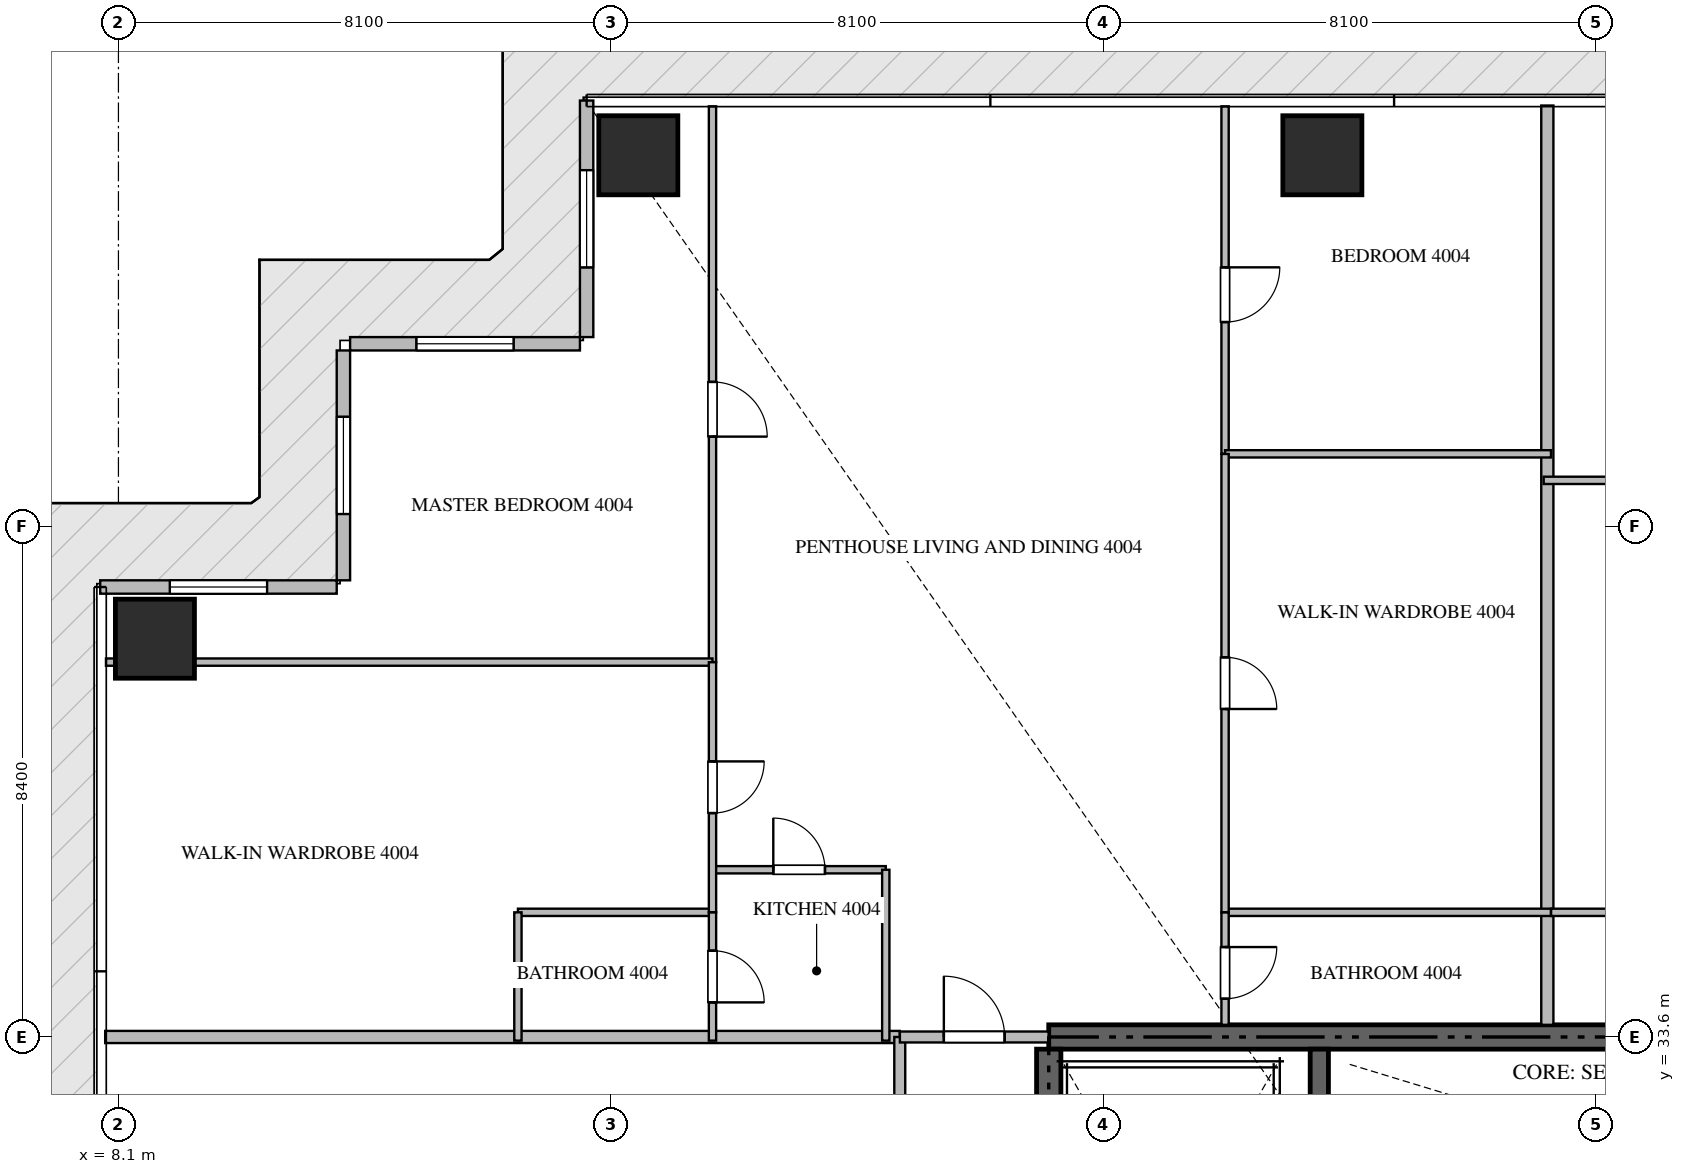
"""IFC4 building model, lengths in metres.
Left out: names, types, materials, properties, quantities, classifications, styles, units other than length and angle.
Written with IfcOpenShell. Run it as: python <this file> out.ifc"""

import sys

from ifc_helpers import new_model, si_unit, direction, frame, frame_2d, origin, origin_2d, place, context, subcontext, project, spatial, rectangle, extrude, source, transform, mapped, element, fill, save


model = new_model("IFC4")
c1 = context("Model", 3, precision=1e-05, world=origin(), true_north=direction((0.0, 1.0)))
c2 = subcontext(c1, "Body", "Model", "MODEL_VIEW")
j1 = project(units=[si_unit("LENGTHUNIT", "METRE"), si_unit("PLANEANGLEUNIT", "RADIAN")], contexts=[c1])
p1 = place(None, origin())
s1 = spatial("IfcSite", under=j1, at=p1, CompositionType="ELEMENT")
p2 = place(p1, origin())
s2 = spatial("IfcBuilding", under=s1, at=p2, CompositionType="ELEMENT")
p3 = place(p2, frame((0.0, 0.0, 161.4)))
s3 = spatial("IfcBuildingStorey", under=s2, at=p3, CompositionType="ELEMENT", Elevation=161.4)
p4 = place(p3, frame((41.4, 33.6, -0.26), z_axis=(0.0, 0.0, 1.0), x_axis=(-1.0, 0.0, 0.0)))
e1 = element("IfcWall", 1, at=p4, inside=s3, PredefinedType="SHEAR", context=c2, shape_type="SweptSolid", body=[
    extrude(rectangle(XDim=18.0, YDim=0.4, at=frame_2d((9.0, 0.0))), origin(), (0.0, 0.0, 1.0), 3.748),
])
p5 = place(p3, frame((23.4, 24.25, -0.26), z_axis=(0.0, 0.0, 1.0), x_axis=(0.0, 1.0, 0.0)))
e2 = element("IfcWall", 2, at=p5, inside=s3, PredefinedType="SHEAR", context=c2, shape_type="SweptSolid", body=[
    extrude(rectangle(XDim=9.15, YDim=0.4, at=frame_2d((4.575, 0.0))), origin(), (0.0, 0.0, 1.0), 3.748),
])
p6 = place(p3, frame((27.85, 23.55, -0.26), z_axis=(0.0, 0.0, 1.0), x_axis=(0.0, 1.0, 0.0)))
e3 = element("IfcWall", 3, at=p6, inside=s3, PredefinedType="SHEAR", context=c2, shape_type="SweptSolid", body=[
    extrude(rectangle(XDim=9.85, YDim=0.3, at=frame_2d((4.925, 0.0))), origin(), (0.0, 0.0, 1.0), 3.748),
])
m1 = source(origin(), c2, "Body", "SweptSolid", [
    extrude(rectangle(XDim=1.3, YDim=1.3, at=origin_2d()), origin(), (0.0, 0.0, 1.0), 3.75),
])
for number, where, z_axis, x_axis in (
    (4, (16.65, 48.1, -0.26), (0.0, 0.0, 1.0), (1.0, 0.0, 0.0)),
    (5, (27.9, 48.1, -0.26), (0.0, 0.0, 1.0), (1.0, 0.0, 0.0)),
    (6, (8.7, 40.15, -0.26), (0.0, 0.0, 1.0), (1.0, 0.0, 0.0)),
):
    element("IfcColumn", number, at=place(p3, frame(where, z_axis=z_axis, x_axis=x_axis)), inside=s3, PredefinedType="COLUMN", context=c2, shape_type="MappedRepresentation", body=[
        mapped(m1, transform((0.0, 0.0, 0.0), scale=1.0)),
    ])
p7 = place(p3, frame((15.8, 49.0, 0.0), z_axis=(0.0, 0.0, 1.0), x_axis=(0.0, -1.0, 0.0)))
e7 = element("IfcWall", 7, at=p7, inside=s3, PredefinedType="ELEMENTEDWALL", context=c2, shape_type="SweptSolid", body=[
    extrude(rectangle(XDim=3.89, YDim=0.22, at=frame_2d((1.945, 0.0))), origin(), (0.0, 0.0, 1.0), 3.475),
])
p8 = place(p7, frame((1.145, 0.0, 0.65)))
e8 = element("IfcOpeningElement", 8, at=p8, cuts=e7, PredefinedType="OPENING", context=c2, shape_type="SweptSolid", body=[
    extrude(rectangle(XDim=1.6, YDim=2.1, at=frame_2d((0.8, 1.05))), frame((0.0, 0.12, 0.0), z_axis=(0.0, -1.0, 0.0), x_axis=(1.0, 0.0, 0.0)), (0.0, 0.0, 1.0), 0.24),
])
p9 = place(p3, frame((15.69, 45.0, 0.0), z_axis=(0.0, 0.0, 1.0), x_axis=(-1.0, 0.0, 0.0)))
e9 = element("IfcWall", 9, at=p9, inside=s3, PredefinedType="ELEMENTEDWALL", context=c2, shape_type="SweptSolid", body=[
    extrude(rectangle(XDim=3.78, YDim=0.22, at=frame_2d((1.89, 0.0))), origin(), (0.0, 0.0, 1.0), 3.475),
])
p10 = place(p9, frame((1.09, 0.0, 0.65)))
e10 = element("IfcOpeningElement", 10, at=p10, cuts=e9, PredefinedType="OPENING", context=c2, shape_type="SweptSolid", body=[
    extrude(rectangle(XDim=1.6, YDim=2.1, at=frame_2d((0.8, 1.05))), frame((0.0, 0.12, 0.0), z_axis=(0.0, -1.0, 0.0), x_axis=(1.0, 0.0, 0.0)), (0.0, 0.0, 1.0), 0.24),
])
p11 = place(p3, frame((11.8, 44.89, 0.0), z_axis=(0.0, 0.0, 1.0), x_axis=(0.0, -1.0, 0.0)))
e11 = element("IfcWall", 11, at=p11, inside=s3, PredefinedType="ELEMENTEDWALL", context=c2, shape_type="SweptSolid", body=[
    extrude(rectangle(XDim=3.78, YDim=0.22, at=frame_2d((1.89, 0.0))), origin(), (0.0, 0.0, 1.0), 3.475),
])
p12 = place(p11, frame((1.09, 0.0, 0.65)))
e12 = element("IfcOpeningElement", 12, at=p12, cuts=e11, PredefinedType="OPENING", context=c2, shape_type="SweptSolid", body=[
    extrude(rectangle(XDim=1.6, YDim=2.1, at=frame_2d((0.8, 1.05))), frame((0.0, 0.12, 0.0), z_axis=(0.0, -1.0, 0.0), x_axis=(1.0, 0.0, 0.0)), (0.0, 0.0, 1.0), 0.24),
])
p13 = place(p3, frame((11.69, 41.0, 0.0), z_axis=(0.0, 0.0, 1.0), x_axis=(-1.0, 0.0, 0.0)))
e13 = element("IfcWall", 13, at=p13, inside=s3, PredefinedType="ELEMENTEDWALL", context=c2, shape_type="SweptSolid", body=[
    extrude(rectangle(XDim=3.89, YDim=0.22, at=frame_2d((1.945, 0.0))), origin(), (0.0, 0.0, 1.0), 3.475),
])
p14 = place(p13, frame((1.145, 0.0, 0.65)))
e14 = element("IfcOpeningElement", 14, at=p14, cuts=e13, PredefinedType="OPENING", context=c2, shape_type="SweptSolid", body=[
    extrude(rectangle(XDim=1.6, YDim=2.1, at=frame_2d((0.8, 1.05))), frame((0.0, 0.12, 0.0), z_axis=(0.0, -1.0, 0.0), x_axis=(1.0, 0.0, 0.0)), (0.0, 0.0, 1.0), 0.24),
])
p15 = place(p3, frame((31.6, 33.8, 0.0), z_axis=(0.0, 0.0, 1.0), x_axis=(0.0, 1.0, 0.0)))
e15 = element("IfcWall", 15, at=p15, inside=s3, PredefinedType="PARTITIONING", context=c2, shape_type="SweptSolid", body=[
    extrude(rectangle(XDim=15.118, YDim=0.2, at=frame_2d((7.559, 0.0))), origin(), (0.0, 0.0, 1.0), 3.49),
])
p16 = place(p3, frame((7.882, 33.6, 0.0), z_axis=(0.0, 0.0, 1.0), x_axis=(1.0, 0.0, 0.0)))
e16 = element("IfcWall", 16, at=p16, inside=s3, PredefinedType="PARTITIONING", context=c2, shape_type="SweptSolid", body=[
    extrude(rectangle(XDim=13.068, YDim=0.2, at=frame_2d((6.534, 0.0))), origin(), (0.0, 0.0, 1.0), 3.49),
])
p17 = place(p3, frame((20.95, 14.9, 0.0), z_axis=(0.0, 0.0, 1.0), x_axis=(0.0, 1.0, 0.0)))
e17 = element("IfcWall", 17, at=p17, inside=s3, PredefinedType="PARTITIONING", context=c2, shape_type="SweptSolid", body=[
    extrude(rectangle(XDim=18.7, YDim=0.18, at=frame_2d((9.35, 0.0))), origin(), (0.0, 0.0, 1.0), 3.49),
])
p18 = place(p17, frame((14.603, 0.0, 0.0)))
e18 = element("IfcOpeningElement", 18, at=p18, cuts=e17, PredefinedType="OPENING", context=c2, shape_type="SweptSolid", body=[
    extrude(rectangle(XDim=1.0, YDim=2.15, at=frame_2d((0.5, 1.075))), frame((0.0, 0.1, 0.0), z_axis=(0.0, -1.0, 0.0), x_axis=(1.0, 0.0, 0.0)), (0.0, 0.0, 1.0), 0.2),
])
p19 = place(p3, frame((20.952, 33.6, 0.0), z_axis=(0.0, 0.0, 1.0), x_axis=(1.0, 0.0, 0.0)))
e19 = element("IfcWall", 19, at=p19, inside=s3, PredefinedType="PARTITIONING", context=c2, shape_type="SweptSolid", body=[
    extrude(rectangle(XDim=2.446, YDim=0.18, at=frame_2d((1.223, 0.0))), origin(), (0.0, 0.0, 1.0), 3.49),
])
p20 = place(p19, frame((0.723, 0.0, 0.0)))
e20 = element("IfcOpeningElement", 20, at=p20, cuts=e19, PredefinedType="OPENING", context=c2, shape_type="SweptSolid", body=[
    extrude(rectangle(XDim=1.0, YDim=2.15, at=frame_2d((0.5, 1.075))), frame((0.0, 0.1, 0.0), z_axis=(0.0, -1.0, 0.0), x_axis=(1.0, 0.0, 0.0)), (0.0, 0.0, 1.0), 0.2),
])
p21 = place(p3, frame((17.87, 36.35, 0.0), z_axis=(0.0, 0.0, 1.0), x_axis=(1.0, 0.0, 0.0)))
e21 = element("IfcWall", 21, at=p21, inside=s3, PredefinedType="PARTITIONING", context=c2, shape_type="SweptSolid", body=[
    extrude(rectangle(XDim=2.85, YDim=0.12, at=frame_2d((1.425, 0.0))), origin(), (0.0, 0.0, 1.0), 3.49),
])
p22 = place(p21, frame((1.0, 0.0, 0.0)))
e22 = element("IfcOpeningElement", 22, at=p22, cuts=e21, PredefinedType="OPENING", context=c2, shape_type="SweptSolid", body=[
    extrude(rectangle(XDim=0.85, YDim=2.1, at=frame_2d((0.425, 1.05))), frame((0.0, 0.07, 0.0), z_axis=(0.0, -1.0, 0.0), x_axis=(1.0, 0.0, 0.0)), (0.0, 0.0, 1.0), 0.14),
])
p23 = place(p3, frame((20.72, 36.35, 0.0), z_axis=(0.0, 0.0, 1.0), x_axis=(0.0, -1.0, 0.0)))
e23 = element("IfcWall", 23, at=p23, inside=s3, PredefinedType="PARTITIONING", context=c2, shape_type="SweptSolid", body=[
    extrude(rectangle(XDim=2.81, YDim=0.12, at=frame_2d((1.405, 0.0))), origin(), (0.0, 0.0, 1.0), 3.49),
])
p24 = place(p3, frame((17.87, 48.905, 0.0), z_axis=(0.0, 0.0, 1.0), x_axis=(0.0, -1.0, 0.0)))
e24 = element("IfcWall", 24, at=p24, inside=s3, PredefinedType="PARTITIONING", context=c2, shape_type="SweptSolid", body=[
    extrude(rectangle(XDim=9.14, YDim=0.12, at=frame_2d((4.57, 0.0))), origin(), (0.0, 0.0, 1.0), 3.49),
])
p25 = place(p24, frame((4.532, 0.0, 0.0)))
e25 = element("IfcOpeningElement", 25, at=p25, cuts=e24, PredefinedType="OPENING", context=c2, shape_type="SweptSolid", body=[
    extrude(rectangle(XDim=0.9, YDim=2.1, at=frame_2d((0.45, 1.05))), frame((0.0, 0.07, 0.0), z_axis=(0.0, -1.0, 0.0), x_axis=(1.0, 0.0, 0.0)), (0.0, 0.0, 1.0), 0.14),
])
p26 = place(p3, frame((7.895, 39.765, 0.0), z_axis=(0.0, 0.0, 1.0), x_axis=(1.0, 0.0, 0.0)))
e26 = element("IfcWall", 26, at=p26, inside=s3, PredefinedType="PARTITIONING", context=c2, shape_type="SweptSolid", body=[
    extrude(rectangle(XDim=9.975, YDim=0.12, at=frame_2d((4.988, 0.0))), origin(), (0.0, 0.0, 1.0), 3.49),
])
p27 = place(p3, frame((14.67, 35.65, 0.0), z_axis=(0.0, 0.0, 1.0), x_axis=(1.0, 0.0, 0.0)))
e27 = element("IfcWall", 27, at=p27, inside=s3, PredefinedType="PARTITIONING", context=c2, shape_type="SweptSolid", body=[
    extrude(rectangle(XDim=3.2, YDim=0.12, at=frame_2d((1.6, 0.0))), origin(), (0.0, 0.0, 1.0), 3.49),
])
p28 = place(p3, frame((14.67, 35.65, 0.0), z_axis=(0.0, 0.0, 1.0), x_axis=(0.0, -1.0, 0.0)))
e28 = element("IfcWall", 28, at=p28, inside=s3, PredefinedType="PARTITIONING", context=c2, shape_type="SweptSolid", body=[
    extrude(rectangle(XDim=2.11, YDim=0.12, at=frame_2d((1.055, 0.0))), origin(), (0.0, 0.0, 1.0), 3.49),
])
p29 = place(p3, frame((17.87, 39.763, 0.0), z_axis=(0.0, 0.0, 1.0), x_axis=(0.0, -1.0, 0.0)))
e29 = element("IfcWall", 29, at=p29, inside=s3, PredefinedType="PARTITIONING", context=c2, shape_type="SweptSolid", body=[
    extrude(rectangle(XDim=4.113, YDim=0.12, at=frame_2d((2.057, 0.0))), origin(), (0.0, 0.0, 1.0), 3.49),
])
p30 = place(p29, frame((1.631, 0.0, 0.0)))
e30 = element("IfcOpeningElement", 30, at=p30, cuts=e29, PredefinedType="OPENING", context=c2, shape_type="SweptSolid", body=[
    extrude(rectangle(XDim=0.85, YDim=2.1, at=frame_2d((0.425, 1.05))), frame((0.0, 0.07, 0.0), z_axis=(0.0, -1.0, 0.0), x_axis=(1.0, 0.0, 0.0)), (0.0, 0.0, 1.0), 0.14),
])
p31 = place(p3, frame((17.87, 35.648, 0.0), z_axis=(0.0, 0.0, 1.0), x_axis=(0.0, -1.0, 0.0)))
e31 = element("IfcWall", 31, at=p31, inside=s3, PredefinedType="PARTITIONING", context=c2, shape_type="SweptSolid", body=[
    extrude(rectangle(XDim=2.108, YDim=0.12, at=frame_2d((1.054, 0.0))), origin(), (0.0, 0.0, 1.0), 3.49),
])
p32 = place(p31, frame((0.629, 0.0, 0.0)))
e32 = element("IfcOpeningElement", 32, at=p32, cuts=e31, PredefinedType="OPENING", context=c2, shape_type="SweptSolid", body=[
    extrude(rectangle(XDim=0.85, YDim=2.1, at=frame_2d((0.425, 1.05))), frame((0.0, 0.07, 0.0), z_axis=(0.0, -1.0, 0.0), x_axis=(1.0, 0.0, 0.0)), (0.0, 0.0, 1.0), 0.14),
])
p33 = place(p3, frame((26.3, 48.905, 0.0), z_axis=(0.0, 0.0, 1.0), x_axis=(0.0, -1.0, 0.0)))
e33 = element("IfcWall", 33, at=p33, inside=s3, PredefinedType="PARTITIONING", context=c2, shape_type="SweptSolid", body=[
    extrude(rectangle(XDim=5.715, YDim=0.12, at=frame_2d((2.857, 0.0))), origin(), (0.0, 0.0, 1.0), 3.49),
])
p34 = place(p33, frame((2.648, 0.0, 0.0)))
e34 = element("IfcOpeningElement", 34, at=p34, cuts=e33, PredefinedType="OPENING", context=c2, shape_type="SweptSolid", body=[
    extrude(rectangle(XDim=0.9, YDim=2.1, at=frame_2d((0.45, 1.05))), frame((0.0, 0.07, 0.0), z_axis=(0.0, -1.0, 0.0), x_axis=(1.0, 0.0, 0.0)), (0.0, 0.0, 1.0), 0.14),
])
for number, where, z_axis, x_axis in (
    (35, (26.3, 43.19, 0.0), (0.0, 0.0, 1.0), (1.0, 0.0, 0.0)),
    (36, (26.3, 35.65, 0.0), (0.0, 0.0, 1.0), (1.0, 0.0, 0.0)),
):
    element("IfcWall", number, at=place(p3, frame(where, z_axis=z_axis, x_axis=x_axis)), inside=s3, PredefinedType="PARTITIONING", context=c2, shape_type="SweptSolid", body=[
        extrude(rectangle(XDim=5.36, YDim=0.12, at=frame_2d((2.68, 0.0))), origin(), (0.0, 0.0, 1.0), 3.49),
    ])
p35 = place(p3, frame((26.3, 43.188, 0.0), z_axis=(0.0, 0.0, 1.0), x_axis=(0.0, -1.0, 0.0)))
e37 = element("IfcWall", 37, at=p35, inside=s3, PredefinedType="PARTITIONING", context=c2, shape_type="SweptSolid", body=[
    extrude(rectangle(XDim=7.538, YDim=0.12, at=frame_2d((3.769, 0.0))), origin(), (0.0, 0.0, 1.0), 3.49),
])
p36 = place(p35, frame((3.344, 0.0, 0.0)))
e38 = element("IfcOpeningElement", 38, at=p36, cuts=e37, PredefinedType="OPENING", context=c2, shape_type="SweptSolid", body=[
    extrude(rectangle(XDim=0.85, YDim=2.1, at=frame_2d((0.425, 1.05))), frame((0.0, 0.07, 0.0), z_axis=(0.0, -1.0, 0.0), x_axis=(1.0, 0.0, 0.0)), (0.0, 0.0, 1.0), 0.14),
])
p37 = place(p3, frame((26.3, 35.648, 0.0), z_axis=(0.0, 0.0, 1.0), x_axis=(0.0, -1.0, 0.0)))
e39 = element("IfcWall", 39, at=p37, inside=s3, PredefinedType="PARTITIONING", context=c2, shape_type="SweptSolid", body=[
    extrude(rectangle(XDim=1.848, YDim=0.12, at=frame_2d((0.924, 0.0))), origin(), (0.0, 0.0, 1.0), 3.49),
])
p38 = place(p37, frame((0.569, 0.0, 0.0)))
e40 = element("IfcOpeningElement", 40, at=p38, cuts=e39, PredefinedType="OPENING", context=c2, shape_type="SweptSolid", body=[
    extrude(rectangle(XDim=0.85, YDim=2.1, at=frame_2d((0.425, 1.05))), frame((0.0, 0.07, 0.0), z_axis=(0.0, -1.0, 0.0), x_axis=(1.0, 0.0, 0.0)), (0.0, 0.0, 1.0), 0.14),
])
p39 = place(p3, frame((31.54, 42.754, 0.0), z_axis=(0.0, 0.0, 1.0), x_axis=(1.0, 0.0, 0.0)))
e41 = element("IfcWall", 41, at=p39, inside=s3, PredefinedType="PARTITIONING", context=c2, shape_type="SweptSolid", body=[
    extrude(rectangle(XDim=6.96, YDim=0.12, at=frame_2d((3.48, 0.0))), origin(), (0.0, 0.0, 1.0), 3.49),
])
p40 = place(p3, frame((31.662, 35.65, 0.0), z_axis=(0.0, 0.0, 1.0), x_axis=(1.0, 0.0, 0.0)))
e42 = element("IfcWall", 42, at=p40, inside=s3, PredefinedType="PARTITIONING", context=c2, shape_type="SweptSolid", body=[
    extrude(rectangle(XDim=6.838, YDim=0.12, at=frame_2d((3.419, 0.0))), origin(), (0.0, 0.0, 1.0), 3.49),
])
m2 = source(origin(), c2, "Body", "SweptSolid", [
    extrude(rectangle(XDim=1.6, YDim=2.1, at=frame_2d((0.8, 1.05))), frame((0.0, 0.03, 0.0), z_axis=(0.0, -1.0, 0.0), x_axis=(1.0, 0.0, 0.0)), (0.0, 0.0, 1.0), 0.06),
])
p41 = place(p8, origin())
e43 = element("IfcWindow", 43, at=p41, inside=s3, PartitioningType="SINGLE_PANEL", PredefinedType="WINDOW", context=c2, shape_type="MappedRepresentation", body=[
    mapped(m2, transform((0.0, 0.0, 0.0), scale=1.0)),
])
fill(e8, e43)
p42 = place(p10, origin())
e44 = element("IfcWindow", 44, at=p42, inside=s3, PartitioningType="SINGLE_PANEL", PredefinedType="WINDOW", context=c2, shape_type="MappedRepresentation", body=[
    mapped(m2, transform((0.0, 0.0, 0.0), scale=1.0)),
])
fill(e10, e44)
p43 = place(p12, origin())
e45 = element("IfcWindow", 45, at=p43, inside=s3, PartitioningType="SINGLE_PANEL", PredefinedType="WINDOW", context=c2, shape_type="MappedRepresentation", body=[
    mapped(m2, transform((0.0, 0.0, 0.0), scale=1.0)),
])
fill(e12, e45)
p44 = place(p14, origin())
e46 = element("IfcWindow", 46, at=p44, inside=s3, PartitioningType="SINGLE_PANEL", PredefinedType="WINDOW", context=c2, shape_type="MappedRepresentation", body=[
    mapped(m2, transform((0.0, 0.0, 0.0), scale=1.0)),
])
fill(e14, e46)
m3 = source(origin(), c2, "Body", "SweptSolid", [
    extrude(rectangle(XDim=1.0, YDim=2.15, at=frame_2d((0.5, 1.075))), frame((0.0, 0.025, 0.0), z_axis=(0.0, -1.0, 0.0), x_axis=(1.0, 0.0, 0.0)), (0.0, 0.0, 1.0), 0.05),
])
p45 = place(p20, origin())
e47 = element("IfcDoor", 47, at=p45, inside=s3, OperationType="SINGLE_SWING_LEFT", PredefinedType="DOOR", context=c2, shape_type="MappedRepresentation", body=[
    mapped(m3, transform((0.0, 0.0, 0.0), scale=1.0)),
])
fill(e20, e47)
m4 = source(origin(), c2, "Body", "SweptSolid", [
    extrude(rectangle(XDim=0.85, YDim=2.1, at=frame_2d((0.425, 1.05))), frame((0.0, 0.025, 0.0), z_axis=(0.0, -1.0, 0.0), x_axis=(1.0, 0.0, 0.0)), (0.0, 0.0, 1.0), 0.05),
])
p46 = place(p22, origin())
e48 = element("IfcDoor", 48, at=p46, inside=s3, OperationType="SINGLE_SWING_LEFT", PredefinedType="DOOR", context=c2, shape_type="MappedRepresentation", body=[
    mapped(m4, transform((0.0, 0.0, 0.0), scale=1.0)),
])
fill(e22, e48)
m5 = source(origin(), c2, "Body", "SweptSolid", [
    extrude(rectangle(XDim=0.9, YDim=2.1, at=frame_2d((0.45, 1.05))), frame((0.0, 0.025, 0.0), z_axis=(0.0, -1.0, 0.0), x_axis=(1.0, 0.0, 0.0)), (0.0, 0.0, 1.0), 0.05),
])
p47 = place(p25, origin())
e49 = element("IfcDoor", 49, at=p47, inside=s3, OperationType="SINGLE_SWING_RIGHT", PredefinedType="DOOR", context=c2, shape_type="MappedRepresentation", body=[
    mapped(m5, transform((0.0, 0.0, 0.0), scale=1.0)),
])
fill(e25, e49)
p48 = place(p30, origin())
e50 = element("IfcDoor", 50, at=p48, inside=s3, OperationType="SINGLE_SWING_LEFT", PredefinedType="DOOR", context=c2, shape_type="MappedRepresentation", body=[
    mapped(m4, transform((0.0, 0.0, 0.0), scale=1.0)),
])
fill(e30, e50)
p49 = place(p32, origin())
e51 = element("IfcDoor", 51, at=p49, inside=s3, OperationType="SINGLE_SWING_RIGHT", PredefinedType="DOOR", context=c2, shape_type="MappedRepresentation", body=[
    mapped(m4, transform((0.0, 0.0, 0.0), scale=1.0)),
])
fill(e32, e51)
p50 = place(p34, origin())
e52 = element("IfcDoor", 52, at=p50, inside=s3, OperationType="SINGLE_SWING_LEFT", PredefinedType="DOOR", context=c2, shape_type="MappedRepresentation", body=[
    mapped(m5, transform((0.0, 0.0, 0.0), scale=1.0)),
])
fill(e34, e52)
p51 = place(p36, origin())
e53 = element("IfcDoor", 53, at=p51, inside=s3, OperationType="SINGLE_SWING_RIGHT", PredefinedType="DOOR", context=c2, shape_type="MappedRepresentation", body=[
    mapped(m4, transform((0.0, 0.0, 0.0), scale=1.0)),
])
fill(e38, e53)
p52 = place(p38, origin())
e54 = element("IfcDoor", 54, at=p52, inside=s3, OperationType="SINGLE_SWING_LEFT", PredefinedType="DOOR", context=c2, shape_type="MappedRepresentation", body=[
    mapped(m4, transform((0.0, 0.0, 0.0), scale=1.0)),
])
fill(e40, e54)
save(model, sys.argv[1])
